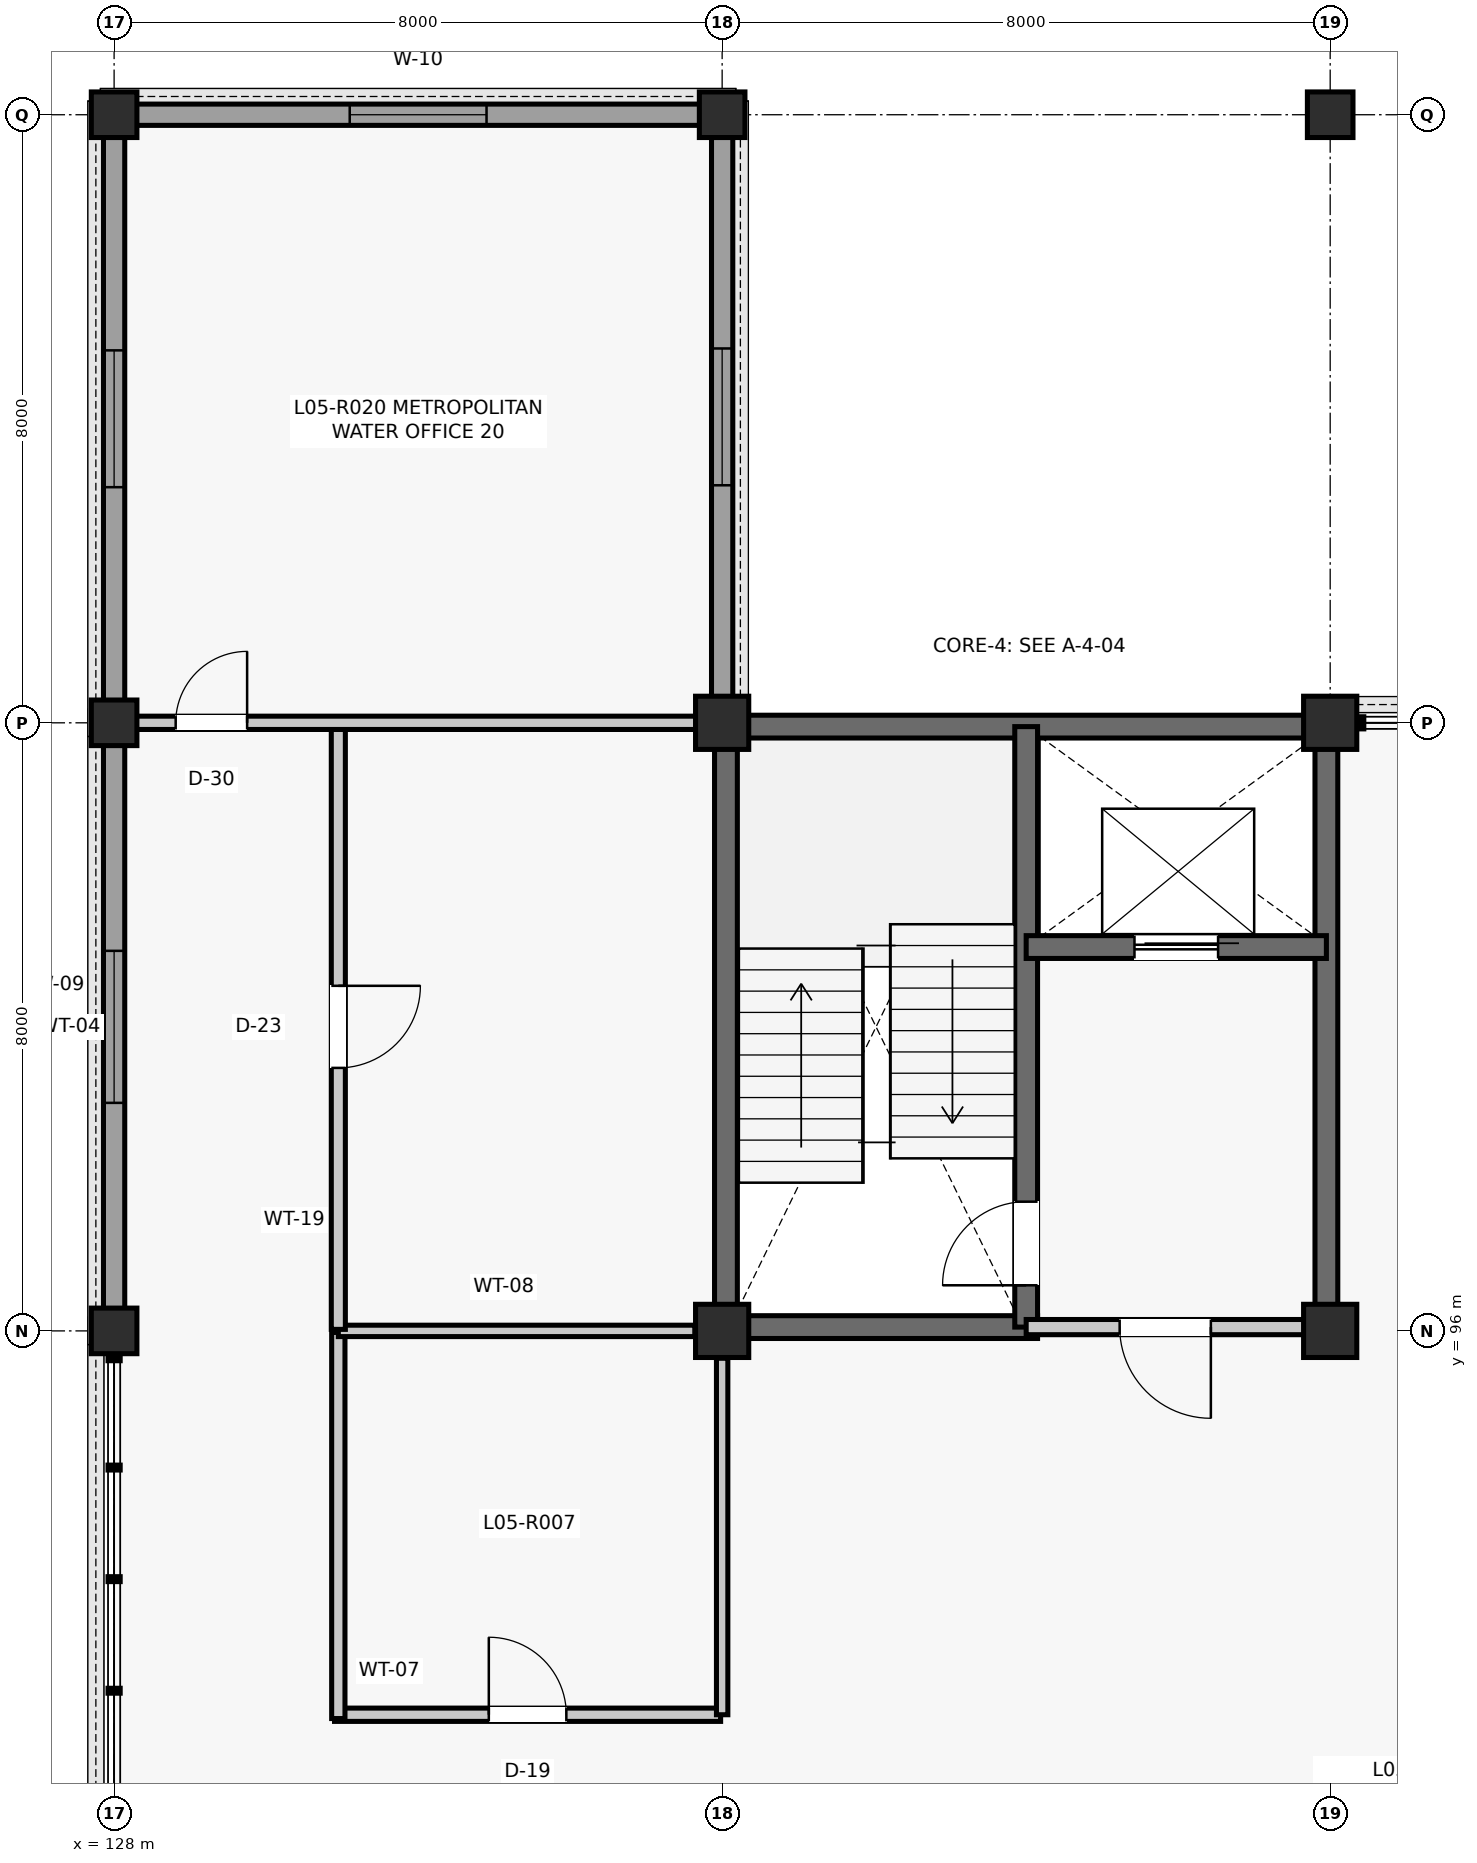
"""IFC4 building model, lengths in metres.
Left out: names, types, materials, properties, quantities, classifications, styles, units other than length and angle.
Written with IfcOpenShell. Run it as: python <this file> out.ifc"""

import sys

from ifc_helpers import new_model, si_unit, direction, frame, frame_2d, origin, origin_2d, place, context, subcontext, project, spatial, rectangle, extrude, element, fill, save


model = new_model("IFC4")
c1 = context("Model", 3, precision=1e-05, world=origin(), true_north=direction((0.0, 1.0)))
c2 = subcontext(c1, "Body", "Model", "MODEL_VIEW")
j1 = project(units=[si_unit("LENGTHUNIT", "METRE"), si_unit("PLANEANGLEUNIT", "RADIAN")], contexts=[c1])
p1 = place(None, origin())
s1 = spatial("IfcSite", under=j1, at=p1, CompositionType="ELEMENT")
p2 = place(p1, origin())
s2 = spatial("IfcBuilding", under=s1, at=p2, CompositionType="ELEMENT")
p3 = place(p2, frame((0.0, 0.0, 21.78)))
s3 = spatial("IfcBuildingStorey", under=s2, at=p3, CompositionType="ELEMENT", Elevation=21.78)
for number, where, z_axis, x_axis in (
    (1, (128.0, 96.0, 0.0), (0.0, 0.0, 1.0), (1.0, 0.0, 0.0)),
    (2, (128.0, 104.0, 0.0), (0.0, 0.0, 1.0), (1.0, 0.0, 0.0)),
    (3, (128.0, 112.0, 0.0), (0.0, 0.0, 1.0), (1.0, 0.0, 0.0)),
):
    element("IfcColumn", number, at=place(p3, frame(where, z_axis=z_axis, x_axis=x_axis)), inside=s3, PredefinedType="COLUMN", context=c2, shape_type="SweptSolid", body=[
        extrude(rectangle(XDim=0.6, YDim=0.6, at=origin_2d()), origin(), (0.0, 0.0, 1.0), 3.96),
    ])
for number, where, z_axis, x_axis in (
    (4, (136.0, 96.0, 0.0), (0.0, 0.0, 1.0), (1.0, 0.0, 0.0)),
    (5, (136.0, 104.0, 0.0), (0.0, 0.0, 1.0), (1.0, 0.0, 0.0)),
):
    element("IfcColumn", number, at=place(p3, frame(where, z_axis=z_axis, x_axis=x_axis)), inside=s3, PredefinedType="COLUMN", context=c2, shape_type="SweptSolid", body=[
        extrude(rectangle(XDim=0.7, YDim=0.7, at=origin_2d()), origin(), (0.0, 0.0, 1.0), 3.96),
    ])
p4 = place(p3, frame((136.0, 112.0, 0.0), z_axis=(0.0, 0.0, 1.0), x_axis=(1.0, 0.0, 0.0)))
e6 = element("IfcColumn", 6, at=p4, inside=s3, PredefinedType="COLUMN", context=c2, shape_type="SweptSolid", body=[
    extrude(rectangle(XDim=0.6, YDim=0.6, at=origin_2d()), origin(), (0.0, 0.0, 1.0), 3.96),
])
for number, where, z_axis, x_axis in (
    (7, (144.0, 96.0, 0.0), (0.0, 0.0, 1.0), (1.0, 0.0, 0.0)),
    (8, (144.0, 104.0, 0.0), (0.0, 0.0, 1.0), (1.0, 0.0, 0.0)),
):
    element("IfcColumn", number, at=place(p3, frame(where, z_axis=z_axis, x_axis=x_axis)), inside=s3, PredefinedType="COLUMN", context=c2, shape_type="SweptSolid", body=[
        extrude(rectangle(XDim=0.7, YDim=0.7, at=origin_2d()), origin(), (0.0, 0.0, 1.0), 3.96),
    ])
p5 = place(p3, frame((144.0, 112.0, 0.0), z_axis=(0.0, 0.0, 1.0), x_axis=(1.0, 0.0, 0.0)))
e9 = element("IfcColumn", 9, at=p5, inside=s3, PredefinedType="COLUMN", context=c2, shape_type="SweptSolid", body=[
    extrude(rectangle(XDim=0.6, YDim=0.6, at=origin_2d()), origin(), (0.0, 0.0, 1.0), 3.96),
])
p6 = place(p3, frame((128.0, 96.285, 0.0), z_axis=(0.0, 0.0, 1.0), x_axis=(0.0, 1.0, 0.0)))
e10 = element("IfcWall", 10, at=p6, inside=s3, PredefinedType="SOLIDWALL", context=c2, shape_type="SweptSolid", body=[
    extrude(rectangle(XDim=7.43, YDim=0.28, at=frame_2d((3.715, 0.0))), origin(), (0.0, 0.0, 1.0), 3.369),
])
p7 = place(p6, frame((2.715, 0.0, 0.9)))
e11 = element("IfcOpeningElement", 11, at=p7, cuts=e10, PredefinedType="OPENING", context=c2, shape_type="SweptSolid", body=[
    extrude(rectangle(XDim=2.0, YDim=2.0, at=frame_2d((1.0, 1.0))), frame((0.0, 0.15, 0.0), z_axis=(0.0, -1.0, 0.0), x_axis=(1.0, 0.0, 0.0)), (0.0, 0.0, 1.0), 0.3),
])
p8 = place(p3, frame((128.285, 112.0, 0.0), z_axis=(0.0, 0.0, 1.0), x_axis=(1.0, 0.0, 0.0)))
e12 = element("IfcWall", 12, at=p8, inside=s3, PredefinedType="SOLIDWALL", context=c2, shape_type="SweptSolid", body=[
    extrude(rectangle(XDim=7.43, YDim=0.28, at=frame_2d((3.715, 0.0))), origin(), (0.0, 0.0, 1.0), 3.372),
])
p9 = place(p8, frame((2.815, 0.0, 0.9)))
e13 = element("IfcOpeningElement", 13, at=p9, cuts=e12, PredefinedType="OPENING", context=c2, shape_type="SweptSolid", body=[
    extrude(rectangle(XDim=1.8, YDim=2.0, at=frame_2d((0.9, 1.0))), frame((0.0, 0.15, 0.0), z_axis=(0.0, -1.0, 0.0), x_axis=(1.0, 0.0, 0.0)), (0.0, 0.0, 1.0), 0.3),
])
p10 = place(p3, frame((128.0, 104.285, 0.0), z_axis=(0.0, 0.0, 1.0), x_axis=(0.0, 1.0, 0.0)))
e14 = element("IfcWall", 14, at=p10, inside=s3, PredefinedType="SOLIDWALL", context=c2, shape_type="SweptSolid", body=[
    extrude(rectangle(XDim=7.43, YDim=0.28, at=frame_2d((3.715, 0.0))), origin(), (0.0, 0.0, 1.0), 3.309),
])
p11 = place(p10, frame((2.815, 0.0, 0.9)))
e15 = element("IfcOpeningElement", 15, at=p11, cuts=e14, PredefinedType="OPENING", context=c2, shape_type="SweptSolid", body=[
    extrude(rectangle(XDim=1.8, YDim=2.0, at=frame_2d((0.9, 1.0))), frame((0.0, 0.15, 0.0), z_axis=(0.0, -1.0, 0.0), x_axis=(1.0, 0.0, 0.0)), (0.0, 0.0, 1.0), 0.3),
])
p12 = place(p3, frame((136.0, 104.335, 0.0), z_axis=(0.0, 0.0, 1.0), x_axis=(0.0, 1.0, 0.0)))
e16 = element("IfcWall", 16, at=p12, inside=s3, PredefinedType="SOLIDWALL", context=c2, shape_type="SweptSolid", body=[
    extrude(rectangle(XDim=7.38, YDim=0.28, at=frame_2d((3.69, 0.0))), origin(), (0.0, 0.0, 1.0), 3.259),
])
p13 = place(p12, frame((2.79, 0.0, 0.9)))
e17 = element("IfcOpeningElement", 17, at=p13, cuts=e16, PredefinedType="OPENING", context=c2, shape_type="SweptSolid", body=[
    extrude(rectangle(XDim=1.8, YDim=2.0, at=frame_2d((0.9, 1.0))), frame((0.0, 0.15, 0.0), z_axis=(0.0, -1.0, 0.0), x_axis=(1.0, 0.0, 0.0)), (0.0, 0.0, 1.0), 0.3),
])
for number, where, z_axis, x_axis in (
    (18, (136.05, 96.24, 0.0), (0.0, 0.0, 1.0), (0.0, 1.0, 0.0)),
    (19, (136.24, 103.95, 0.0), (0.0, 0.0, 1.0), (1.0, 0.0, 0.0)),
    (20, (143.95, 96.24, 0.0), (0.0, 0.0, 1.0), (0.0, 1.0, 0.0)),
):
    element("IfcWall", number, at=place(p3, frame(where, z_axis=z_axis, x_axis=x_axis)), inside=s3, PredefinedType="SHEAR", context=c2, shape_type="SweptSolid", body=[
        extrude(rectangle(XDim=7.52, YDim=0.3, at=frame_2d((3.76, 0.0))), origin(), (0.0, 0.0, 1.0), 3.735),
    ])
p14 = place(p3, frame((136.24, 96.05, 0.0), z_axis=(0.0, 0.0, 1.0), x_axis=(1.0, 0.0, 0.0)))
e21 = element("IfcWall", 21, at=p14, inside=s3, PredefinedType="SHEAR", context=c2, shape_type="SweptSolid", body=[
    extrude(rectangle(XDim=3.91, YDim=0.3, at=frame_2d((1.955, 0.0))), origin(), (0.0, 0.0, 1.0), 3.735),
])
p15 = place(p3, frame((140.0, 96.05, 0.0), z_axis=(0.0, 0.0, 1.0), x_axis=(0.0, 1.0, 0.0)))
e22 = element("IfcWall", 22, at=p15, inside=s3, PredefinedType="SHEAR", context=c2, shape_type="SweptSolid", body=[
    extrude(rectangle(XDim=7.9, YDim=0.3, at=frame_2d((3.95, 0.0))), origin(), (0.0, 0.0, 1.0), 3.735),
])
p16 = place(p15, frame((0.55, 0.0, 0.0)))
e23 = element("IfcOpeningElement", 23, at=p16, cuts=e22, PredefinedType="OPENING", context=c2, shape_type="SweptSolid", body=[
    extrude(rectangle(XDim=1.1, YDim=2.15, at=frame_2d((0.55, 1.075))), frame((0.0, 0.16, 0.0), z_axis=(0.0, -1.0, 0.0), x_axis=(1.0, 0.0, 0.0)), (0.0, 0.0, 1.0), 0.32),
])
p17 = place(p3, frame((140.0, 101.05, 0.0), z_axis=(0.0, 0.0, 1.0), x_axis=(1.0, 0.0, 0.0)))
e24 = element("IfcWall", 24, at=p17, inside=s3, PredefinedType="SHEAR", context=c2, shape_type="SweptSolid", body=[
    extrude(rectangle(XDim=3.95, YDim=0.3, at=frame_2d((1.975, 0.0))), origin(), (0.0, 0.0, 1.0), 3.735),
])
p18 = place(p17, frame((1.425, 0.0, 0.0)))
e25 = element("IfcOpeningElement", 25, at=p18, cuts=e24, PredefinedType="OPENING", context=c2, shape_type="SweptSolid", body=[
    extrude(rectangle(XDim=1.1, YDim=2.2, at=frame_2d((0.55, 1.1))), frame((0.0, 0.16, 0.0), z_axis=(0.0, -1.0, 0.0), x_axis=(1.0, 0.0, 0.0)), (0.0, 0.0, 1.0), 0.32),
])
p19 = place(p3, frame((140.0, 96.05, 0.0), z_axis=(0.0, 0.0, 1.0), x_axis=(1.0, 0.0, 0.0)))
e26 = element("IfcWall", 26, at=p19, inside=s3, PredefinedType="PARTITIONING", context=c2, shape_type="SweptSolid", body=[
    extrude(rectangle(XDim=3.66, YDim=0.2, at=frame_2d((1.83, 0.0))), origin(), (0.0, 0.0, 1.0), 3.263),
])
p20 = place(p19, frame((1.23, 0.0, 0.0)))
e27 = element("IfcOpeningElement", 27, at=p20, cuts=e26, PredefinedType="OPENING", context=c2, shape_type="SweptSolid", body=[
    extrude(rectangle(XDim=1.2, YDim=2.15, at=frame_2d((0.6, 1.075))), frame((0.0, 0.11, 0.0), z_axis=(0.0, -1.0, 0.0), x_axis=(1.0, 0.0, 0.0)), (0.0, 0.0, 1.0), 0.22),
])
p21 = place(p3, frame((130.9, 90.95, 0.0), z_axis=(0.0, 0.0, 1.0), x_axis=(1.0, 0.0, 0.0)))
e28 = element("IfcWall", 28, at=p21, inside=s3, PredefinedType="PARTITIONING", context=c2, shape_type="SweptSolid", body=[
    extrude(rectangle(XDim=5.08, YDim=0.175, at=frame_2d((2.54, 0.0))), origin(), (0.0, 0.0, 1.0), 3.258),
])
p22 = place(p21, frame((2.03, 0.0, 0.0)))
e29 = element("IfcOpeningElement", 29, at=p22, cuts=e28, PredefinedType="OPENING", context=c2, shape_type="SweptSolid", body=[
    extrude(rectangle(XDim=1.02, YDim=2.2, at=frame_2d((0.51, 1.1))), frame((0.0, 0.097, 0.0), z_axis=(0.0, -1.0, 0.0), x_axis=(1.0, 0.0, 0.0)), (0.0, 0.0, 1.0), 0.195),
])
p23 = place(p3, frame((130.95, 90.9, 0.0), z_axis=(0.0, 0.0, 1.0), x_axis=(0.0, 1.0, 0.0)))
e30 = element("IfcWall", 30, at=p23, inside=s3, PredefinedType="PARTITIONING", context=c2, shape_type="SweptSolid", body=[
    extrude(rectangle(XDim=5.08, YDim=0.175, at=frame_2d((2.54, 0.0))), origin(), (0.0, 0.0, 1.0), 3.252),
])
p24 = place(p3, frame((130.95, 96.0, 0.0), z_axis=(0.0, 0.0, 1.0), x_axis=(1.0, 0.0, 0.0)))
e31 = element("IfcWall", 31, at=p24, inside=s3, PredefinedType="PARTITIONING", context=c2, shape_type="SweptSolid", body=[
    extrude(rectangle(XDim=4.69, YDim=0.15, at=frame_2d((2.345, 0.0))), origin(), (0.0, 0.0, 1.0), 3.252),
])
p25 = place(p3, frame((136.0, 90.95, 0.0), z_axis=(0.0, 0.0, 1.0), x_axis=(0.0, 1.0, 0.0)))
e32 = element("IfcWall", 32, at=p25, inside=s3, PredefinedType="PARTITIONING", context=c2, shape_type="SweptSolid", body=[
    extrude(rectangle(XDim=4.69, YDim=0.15, at=frame_2d((2.345, 0.0))), origin(), (0.0, 0.0, 1.0), 3.258),
])
p26 = place(p3, frame((130.95, 96.02, 0.0), z_axis=(0.0, 0.0, 1.0), x_axis=(0.0, 1.0, 0.0)))
e33 = element("IfcWall", 33, at=p26, inside=s3, PredefinedType="PARTITIONING", context=c2, shape_type="SweptSolid", body=[
    extrude(rectangle(XDim=7.96, YDim=0.185, at=frame_2d((3.98, 0.0))), origin(), (0.0, 0.0, 1.0), 3.252),
])
p27 = place(p26, frame((3.44, 0.0, 0.0)))
e34 = element("IfcOpeningElement", 34, at=p27, cuts=e33, PredefinedType="OPENING", context=c2, shape_type="SweptSolid", body=[
    extrude(rectangle(XDim=1.08, YDim=2.2, at=frame_2d((0.54, 1.1))), frame((0.0, 0.103, 0.0), z_axis=(0.0, -1.0, 0.0), x_axis=(1.0, 0.0, 0.0)), (0.0, 0.0, 1.0), 0.205),
])
p28 = place(p3, frame((128.29, 104.0, 0.0), z_axis=(0.0, 0.0, 1.0), x_axis=(1.0, 0.0, 0.0)))
e35 = element("IfcWall", 35, at=p28, inside=s3, PredefinedType="PARTITIONING", context=c2, shape_type="SweptSolid", body=[
    extrude(rectangle(XDim=7.37, YDim=0.175, at=frame_2d((3.685, 0.0))), origin(), (0.0, 0.0, 1.0), 3.258),
])
p29 = place(p28, frame((0.52, 0.0, 0.0)))
e36 = element("IfcOpeningElement", 36, at=p29, cuts=e35, PredefinedType="OPENING", context=c2, shape_type="SweptSolid", body=[
    extrude(rectangle(XDim=0.94, YDim=2.12, at=frame_2d((0.47, 1.06))), frame((0.0, 0.097, 0.0), z_axis=(0.0, -1.0, 0.0), x_axis=(1.0, 0.0, 0.0)), (0.0, 0.0, 1.0), 0.195),
])
p30 = place(p7, origin())
e37 = element("IfcWindow", 37, at=p30, inside=s3, PartitioningType="SINGLE_PANEL", PredefinedType="WINDOW", context=c2, shape_type="SweptSolid", body=[
    extrude(rectangle(XDim=2.0, YDim=2.0, at=frame_2d((1.0, 1.0))), frame((0.0, 0.03, 0.0), z_axis=(0.0, -1.0, 0.0), x_axis=(1.0, 0.0, 0.0)), (0.0, 0.0, 1.0), 0.06),
])
fill(e11, e37)
p31 = place(p9, origin())
e38 = element("IfcWindow", 38, at=p31, inside=s3, PartitioningType="SINGLE_PANEL", PredefinedType="WINDOW", context=c2, shape_type="SweptSolid", body=[
    extrude(rectangle(XDim=1.8, YDim=2.0, at=frame_2d((0.9, 1.0))), frame((0.0, 0.03, 0.0), z_axis=(0.0, -1.0, 0.0), x_axis=(1.0, 0.0, 0.0)), (0.0, 0.0, 1.0), 0.06),
])
fill(e13, e38)
p32 = place(p11, origin())
e39 = element("IfcWindow", 39, at=p32, inside=s3, PartitioningType="SINGLE_PANEL", PredefinedType="WINDOW", context=c2, shape_type="SweptSolid", body=[
    extrude(rectangle(XDim=1.8, YDim=2.0, at=frame_2d((0.9, 1.0))), frame((0.0, 0.03, 0.0), z_axis=(0.0, -1.0, 0.0), x_axis=(1.0, 0.0, 0.0)), (0.0, 0.0, 1.0), 0.06),
])
fill(e15, e39)
p33 = place(p13, origin())
e40 = element("IfcWindow", 40, at=p33, inside=s3, PartitioningType="SINGLE_PANEL", PredefinedType="WINDOW", context=c2, shape_type="SweptSolid", body=[
    extrude(rectangle(XDim=1.8, YDim=2.0, at=frame_2d((0.9, 1.0))), frame((0.0, 0.03, 0.0), z_axis=(0.0, -1.0, 0.0), x_axis=(1.0, 0.0, 0.0)), (0.0, 0.0, 1.0), 0.06),
])
fill(e17, e40)
p34 = place(p16, origin())
e41 = element("IfcDoor", 41, at=p34, inside=s3, OperationType="SINGLE_SWING_LEFT", PredefinedType="DOOR", context=c2, shape_type="SweptSolid", body=[
    extrude(rectangle(XDim=1.1, YDim=2.15, at=frame_2d((0.55, 1.075))), frame((0.0, 0.025, 0.0), z_axis=(0.0, -1.0, 0.0), x_axis=(1.0, 0.0, 0.0)), (0.0, 0.0, 1.0), 0.05),
])
fill(e23, e41)
p35 = place(p18, origin())
e42 = element("IfcDoor", 42, at=p35, inside=s3, OperationType="SLIDING_TO_LEFT", PredefinedType="DOOR", context=c2, shape_type="SweptSolid", body=[
    extrude(rectangle(XDim=1.1, YDim=2.2, at=frame_2d((0.55, 1.1))), frame((0.0, 0.025, 0.0), z_axis=(0.0, -1.0, 0.0), x_axis=(1.0, 0.0, 0.0)), (0.0, 0.0, 1.0), 0.05),
])
fill(e25, e42)
p36 = place(p20, frame((1.2, 0.0, 0.0), z_axis=(0.0, 0.0, 1.0), x_axis=(-1.0, 0.0, 0.0)))
e43 = element("IfcDoor", 43, at=p36, inside=s3, OperationType="SINGLE_SWING_RIGHT", PredefinedType="DOOR", context=c2, shape_type="SweptSolid", body=[
    extrude(rectangle(XDim=1.2, YDim=2.15, at=frame_2d((0.6, 1.075))), frame((0.0, 0.025, 0.0), z_axis=(0.0, -1.0, 0.0), x_axis=(1.0, 0.0, 0.0)), (0.0, 0.0, 1.0), 0.05),
])
fill(e27, e43)
p37 = place(p22, origin())
e44 = element("IfcDoor", 44, at=p37, inside=s3, OperationType="SINGLE_SWING_LEFT", PredefinedType="DOOR", context=c2, shape_type="SweptSolid", body=[
    extrude(rectangle(XDim=1.02, YDim=2.2, at=frame_2d((0.51, 1.1))), frame((0.0, 0.025, 0.0), z_axis=(0.0, -1.0, 0.0), x_axis=(1.0, 0.0, 0.0)), (0.0, 0.0, 1.0), 0.05),
])
fill(e29, e44)
p38 = place(p27, frame((1.08, 0.0, 0.0), z_axis=(0.0, 0.0, 1.0), x_axis=(-1.0, 0.0, 0.0)))
e45 = element("IfcDoor", 45, at=p38, inside=s3, OperationType="SINGLE_SWING_RIGHT", PredefinedType="DOOR", context=c2, shape_type="SweptSolid", body=[
    extrude(rectangle(XDim=1.08, YDim=2.2, at=frame_2d((0.54, 1.1))), frame((0.0, 0.025, 0.0), z_axis=(0.0, -1.0, 0.0), x_axis=(1.0, 0.0, 0.0)), (0.0, 0.0, 1.0), 0.05),
])
fill(e34, e45)
p39 = place(p29, origin())
e46 = element("IfcDoor", 46, at=p39, inside=s3, OperationType="SINGLE_SWING_RIGHT", PredefinedType="DOOR", context=c2, shape_type="SweptSolid", body=[
    extrude(rectangle(XDim=0.94, YDim=2.12, at=frame_2d((0.47, 1.06))), frame((0.0, 0.025, 0.0), z_axis=(0.0, -1.0, 0.0), x_axis=(1.0, 0.0, 0.0)), (0.0, 0.0, 1.0), 0.05),
])
fill(e36, e46)
save(model, sys.argv[1])
